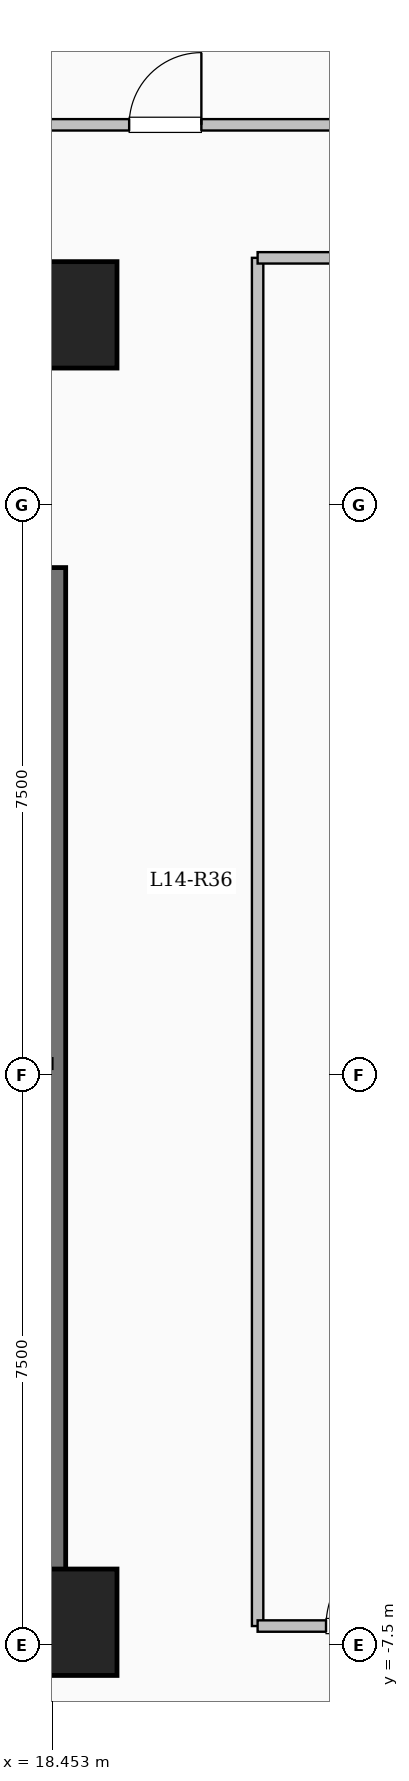
"""IFC4 building model, lengths in metres.
Left out: names, types, materials, properties, quantities, classifications, styles, units other than length and angle.
Written with IfcOpenShell. Run it as: python <this file> out.ifc"""

import sys

from ifc_helpers import new_model, si_unit, direction, frame, frame_2d, origin, origin_2d, place, context, subcontext, project, spatial, rectangle, extrude, element, fill, save


model = new_model("IFC4")
c1 = context("Model", 3, precision=1e-05, world=origin(), true_north=direction((0.0, 1.0)))
c2 = subcontext(c1, "Body", "Model", "MODEL_VIEW")
j1 = project(units=[si_unit("LENGTHUNIT", "METRE"), si_unit("PLANEANGLEUNIT", "RADIAN")], contexts=[c1])
p1 = place(None, origin())
s1 = spatial("IfcSite", under=j1, at=p1, CompositionType="ELEMENT")
p2 = place(p1, origin())
s2 = spatial("IfcBuilding", under=s1, at=p2, CompositionType="ELEMENT")
p3 = place(p2, frame((0.0, 0.0, 54.15)))
s3 = spatial("IfcBuildingStorey", under=s2, at=p3, CompositionType="ELEMENT", Elevation=54.15)
for number, where, z_axis, x_axis in (
    (1, (18.6, -7.2, 0.0), (0.0, 0.0, 1.0), (1.0, 0.0, 0.0)),
    (2, (18.6, 10.0, 0.0), (0.0, 0.0, 1.0), (1.0, 0.0, 0.0)),
):
    element("IfcColumn", number, at=place(p3, frame(where, z_axis=z_axis, x_axis=x_axis)), inside=s3, PredefinedType="COLUMN", context=c2, shape_type="SweptSolid", body=[
        extrude(rectangle(XDim=1.4, YDim=1.4, at=origin_2d()), origin(), (0.0, 0.0, 1.0), 3.35),
    ])
p4 = place(p3, frame((18.45, -7.375, 0.0), z_axis=(0.0, 0.0, 1.0), x_axis=(0.0, 1.0, 0.0)))
e3 = element("IfcWall", 3, at=p4, inside=s3, PredefinedType="SHEAR", context=c2, shape_type="SweptSolid", body=[
    extrude(rectangle(XDim=14.05, YDim=0.35, at=frame_2d((7.025, 0.0))), origin(), (0.0, 0.0, 1.0), 3.35),
])
p5 = place(p3, frame((10.075, -7.2, 0.0), z_axis=(0.0, 0.0, 1.0), x_axis=(1.0, 0.0, 0.0)))
e4 = element("IfcWall", 4, at=p5, inside=s3, PredefinedType="SHEAR", context=c2, shape_type="SweptSolid", body=[
    extrude(rectangle(XDim=8.55, YDim=0.35, at=frame_2d((4.275, 0.0))), origin(), (0.0, 0.0, 1.0), 3.35),
])
p6 = place(p3, frame((3.85, 12.5, 0.0), z_axis=(0.0, 0.0, 1.0), x_axis=(1.0, 0.0, 0.0)))
e5 = element("IfcWall", 5, at=p6, inside=s3, PredefinedType="PARTITIONING", context=c2, shape_type="SweptSolid", body=[
    extrude(rectangle(XDim=18.7, YDim=0.15, at=frame_2d((9.35, 0.0))), origin(), (0.0, 0.0, 1.0), 3.1),
])
p7 = place(p6, frame((2.942, 0.0, 0.0)))
e6 = element("IfcOpeningElement", 6, at=p7, cuts=e5, PredefinedType="OPENING", context=c2, shape_type="SweptSolid", body=[
    extrude(rectangle(XDim=0.95, YDim=2.15, at=frame_2d((0.475, 1.075))), frame((0.0, 0.085, 0.0), z_axis=(0.0, -1.0, 0.0), x_axis=(1.0, 0.0, 0.0)), (0.0, 0.0, 1.0), 0.17),
])
p8 = place(p6, frame((9.647, 0.0, 0.0)))
e7 = element("IfcOpeningElement", 7, at=p8, cuts=e5, PredefinedType="OPENING", context=c2, shape_type="SweptSolid", body=[
    extrude(rectangle(XDim=0.95, YDim=2.15, at=frame_2d((0.475, 1.075))), frame((0.0, 0.085, 0.0), z_axis=(0.0, -1.0, 0.0), x_axis=(1.0, 0.0, 0.0)), (0.0, 0.0, 1.0), 0.17),
])
p9 = place(p6, frame((15.61, 0.0, 0.0)))
e8 = element("IfcOpeningElement", 8, at=p9, cuts=e5, PredefinedType="OPENING", context=c2, shape_type="SweptSolid", body=[
    extrude(rectangle(XDim=0.95, YDim=2.15, at=frame_2d((0.475, 1.075))), frame((0.0, 0.085, 0.0), z_axis=(0.0, -1.0, 0.0), x_axis=(1.0, 0.0, 0.0)), (0.0, 0.0, 1.0), 0.17),
])
p10 = place(p3, frame((21.15, -7.25, 0.0), z_axis=(0.0, 0.0, 1.0), x_axis=(0.0, 1.0, 0.0)))
e9 = element("IfcWall", 9, at=p10, inside=s3, PredefinedType="PARTITIONING", context=c2, shape_type="SweptSolid", body=[
    extrude(rectangle(XDim=18.0, YDim=0.15, at=frame_2d((9.0, 0.0))), origin(), (0.0, 0.0, 1.0), 2.585),
])
p11 = place(p3, frame((21.15, -7.25, 0.0), z_axis=(0.0, 0.0, 1.0), x_axis=(1.0, 0.0, 0.0)))
e10 = element("IfcWall", 10, at=p11, inside=s3, PredefinedType="PARTITIONING", context=c2, shape_type="SweptSolid", body=[
    extrude(rectangle(XDim=7.53, YDim=0.15, at=frame_2d((3.765, 0.0))), origin(), (0.0, 0.0, 1.0), 3.1),
])
p12 = place(p11, frame((0.9, 0.0, 0.0)))
e11 = element("IfcOpeningElement", 11, at=p12, cuts=e10, PredefinedType="OPENING", context=c2, shape_type="SweptSolid", body=[
    extrude(rectangle(XDim=1.08, YDim=2.15, at=frame_2d((0.54, 1.075))), frame((0.0, 0.085, 0.0), z_axis=(0.0, -1.0, 0.0), x_axis=(1.0, 0.0, 0.0)), (0.0, 0.0, 1.0), 0.17),
])
p13 = place(p3, frame((21.15, 10.75, 0.0), z_axis=(0.0, 0.0, 1.0), x_axis=(1.0, 0.0, 0.0)))
e12 = element("IfcWall", 12, at=p13, inside=s3, PredefinedType="PARTITIONING", context=c2, shape_type="SweptSolid", body=[
    extrude(rectangle(XDim=7.53, YDim=0.15, at=frame_2d((3.765, 0.0))), origin(), (0.0, 0.0, 1.0), 3.1),
])
p14 = place(p9, origin())
e13 = element("IfcDoor", 13, at=p14, inside=s3, OperationType="SINGLE_SWING_RIGHT", PredefinedType="DOOR", context=c2, shape_type="SweptSolid", body=[
    extrude(rectangle(XDim=0.95, YDim=2.15, at=frame_2d((0.475, 1.075))), frame((0.0, 0.025, 0.0), z_axis=(0.0, -1.0, 0.0), x_axis=(1.0, 0.0, 0.0)), (0.0, 0.0, 1.0), 0.05),
])
fill(e8, e13)
p15 = place(p12, origin())
e14 = element("IfcDoor", 14, at=p15, inside=s3, OperationType="SINGLE_SWING_RIGHT", PredefinedType="DOOR", context=c2, shape_type="SweptSolid", body=[
    extrude(rectangle(XDim=1.08, YDim=2.15, at=frame_2d((0.54, 1.075))), frame((0.0, 0.025, 0.0), z_axis=(0.0, -1.0, 0.0), x_axis=(1.0, 0.0, 0.0)), (0.0, 0.0, 1.0), 0.05),
])
fill(e11, e14)
save(model, sys.argv[1])
